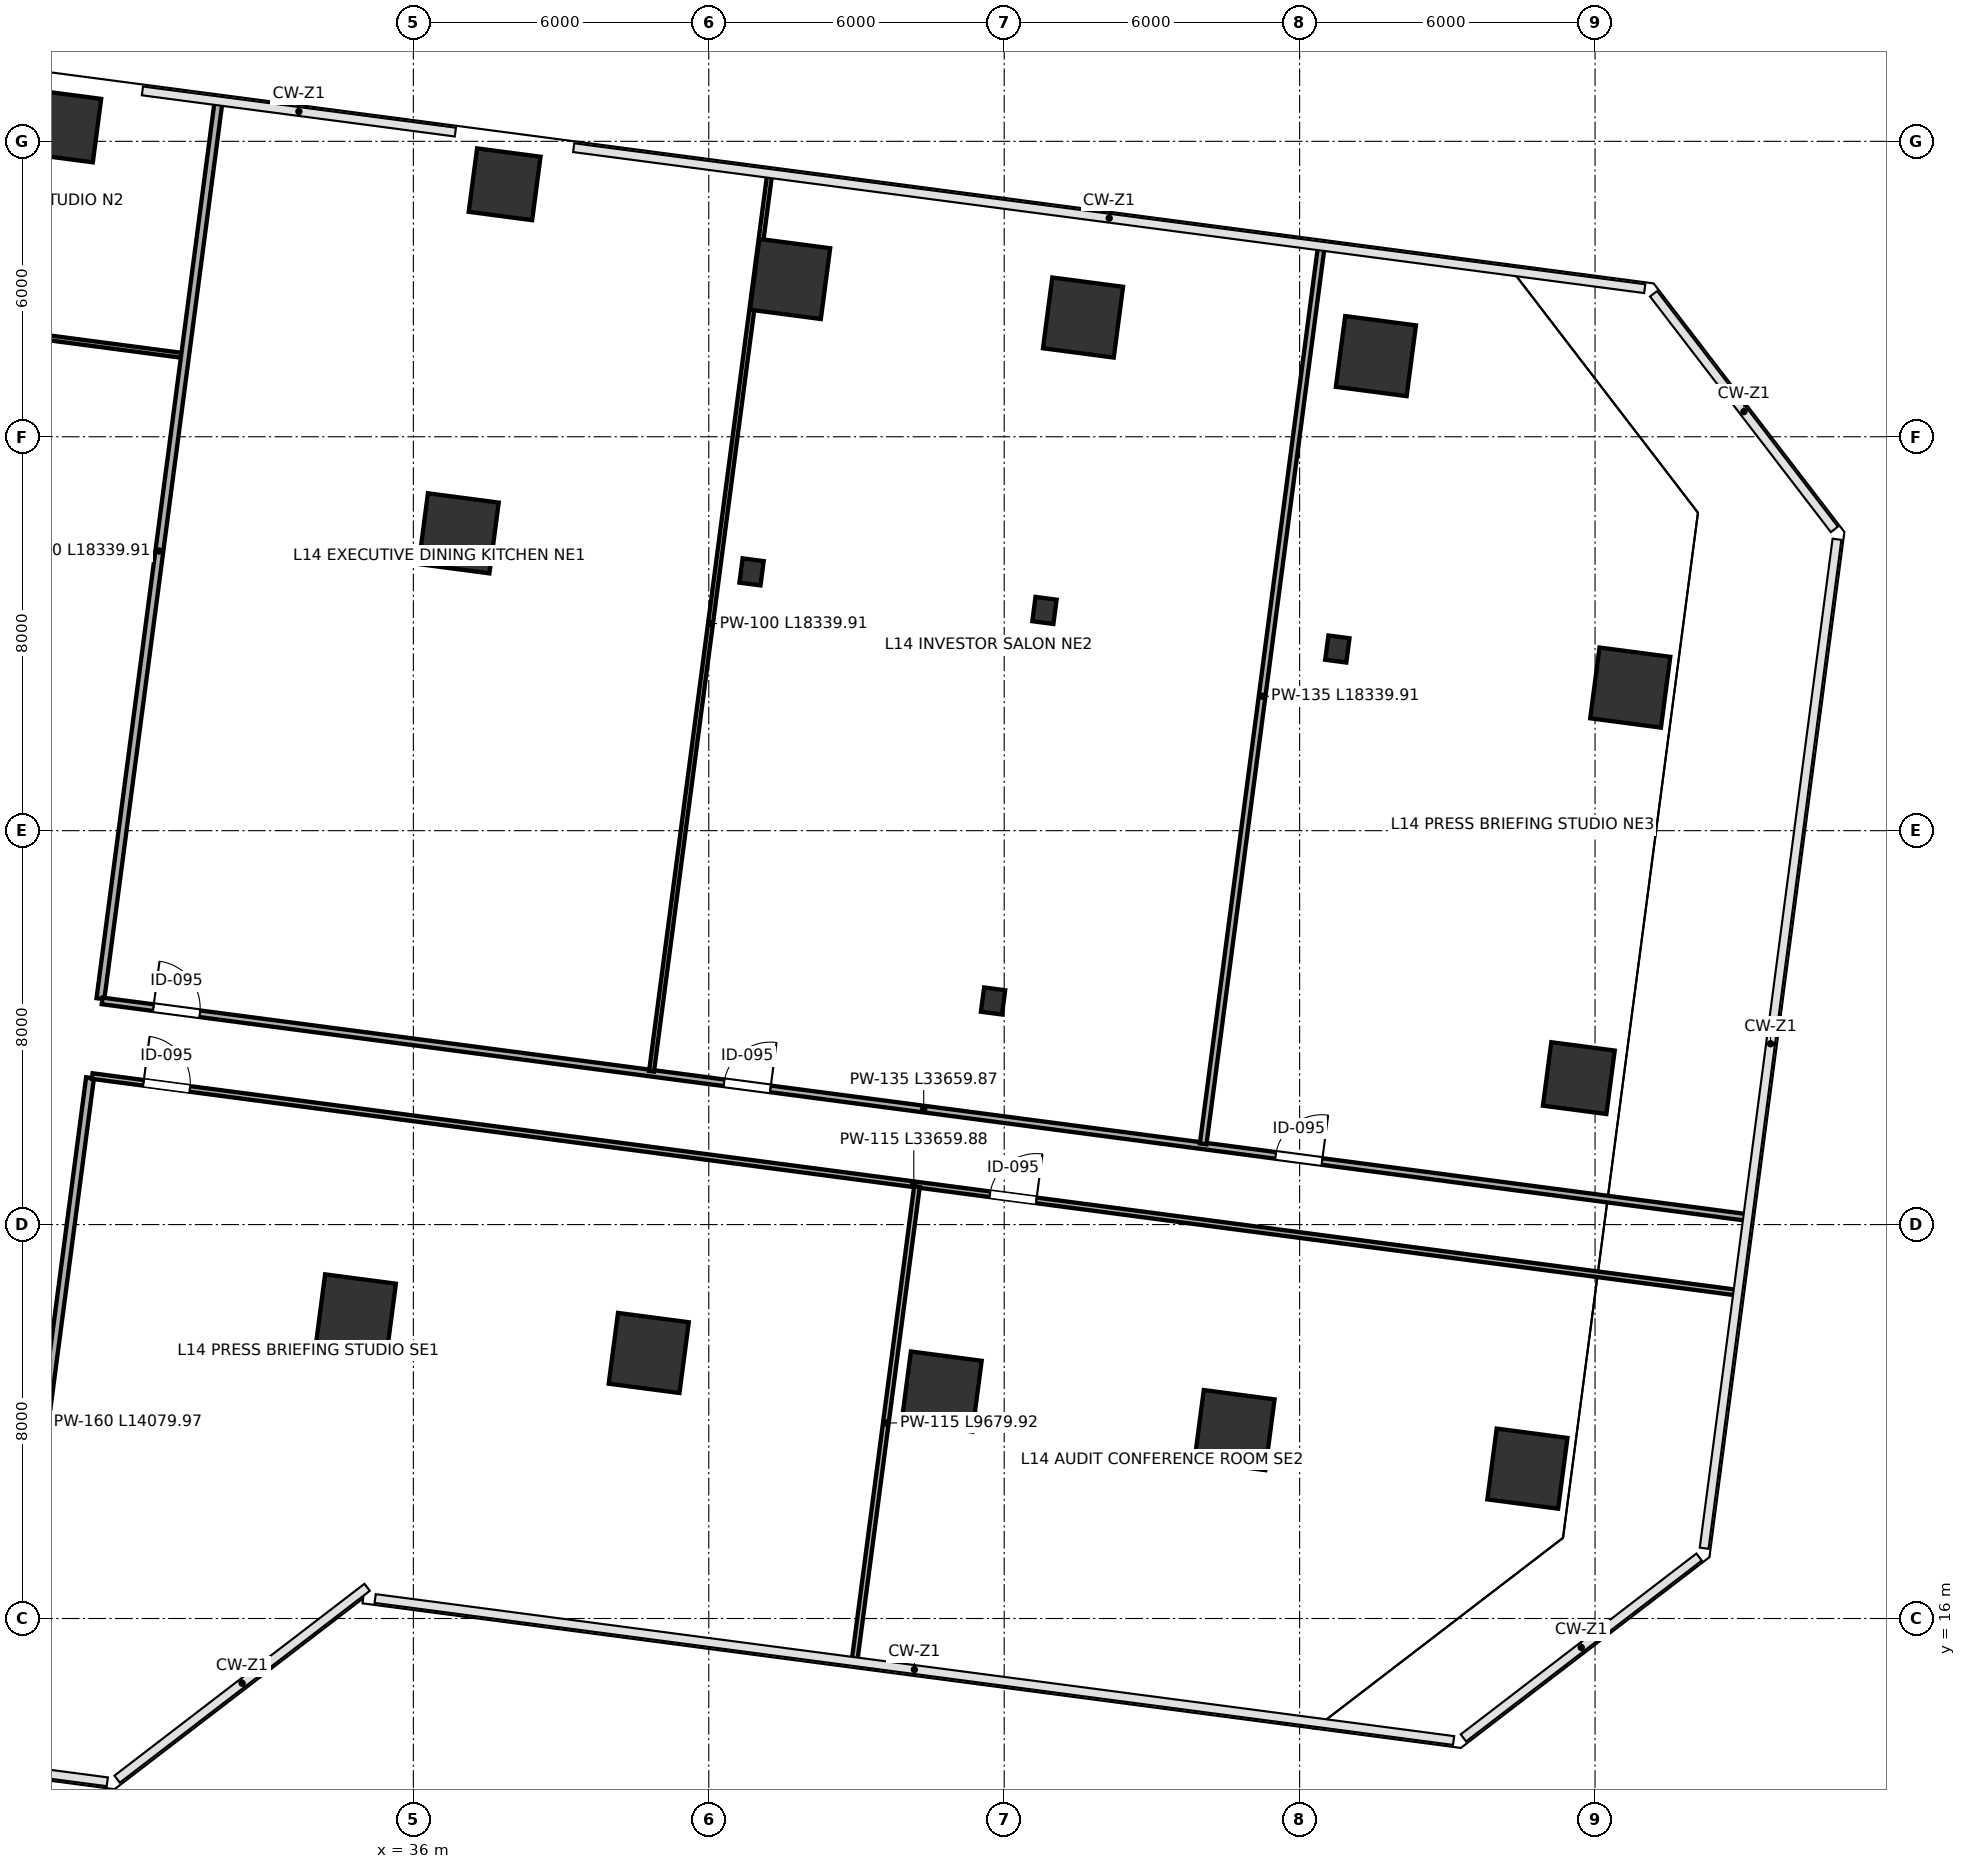
"""IFC4 building model, lengths in metres.
Left out: names, types, materials, properties, quantities, classifications, styles, units other than length and angle.
Written with IfcOpenShell. Run it as: python <this file> out.ifc"""

import sys

from ifc_helpers import new_model, si_unit, direction, frame, frame_2d, origin, origin_2d, place, context, subcontext, project, spatial, rectangle, i_section, extrude, clip, halfspace, source, transform, mapped, element, fill, save


model = new_model("IFC4")
c1 = context("Model", 3, precision=1e-05, world=origin(), true_north=direction((0.0, 1.0)))
c2 = subcontext(c1, "Body", "Model", "MODEL_VIEW")
j1 = project(units=[si_unit("LENGTHUNIT", "METRE"), si_unit("PLANEANGLEUNIT", "RADIAN")], contexts=[c1])
p1 = place(None, origin())
s1 = spatial("IfcSite", under=j1, at=p1, CompositionType="ELEMENT")
p2 = place(p1, origin())
s2 = spatial("IfcBuilding", under=s1, at=p2, CompositionType="ELEMENT")
p3 = place(p2, frame((0.0, 0.0, 66.4)))
s3 = spatial("IfcBuildingStorey", under=s2, at=p3, CompositionType="ELEMENT", Elevation=66.4)
p4 = place(p3, frame((28.93, 46.302, 0.0), z_axis=(0.073620538621, -0.039272010374, 0.996512782404), x_axis=(-0.581397277632, -0.813546918552, 0.010891137473)))
e1 = element("IfcColumn", 1, at=p4, inside=s3, PredefinedType="COLUMN", context=c2, shape_type="Clipping", body=[
    clip(clip(extrude(rectangle(XDim=1.3, YDim=1.3, at=origin_2d()), origin(), (0.0, 0.0, 1.0), 4.215), halfspace(frame((0.0, 0.0, 0.062), z_axis=(0.0, 0.0, -1.0), x_axis=(1.0, 0.0, 0.0)), False)), halfspace(frame((0.0, 0.0, 4.153), z_axis=(0.0, 0.0, 1.0), x_axis=(1.0, 0.0, 0.0)), False)),
])
p5 = place(p3, frame((34.832, 22.176, 0.0), z_axis=(-0.051599647604, -0.068452057765, 0.996319121645), x_axis=(-0.713426528526, 0.70064070417, 0.011188925565)))
e2 = element("IfcColumn", 2, at=p5, inside=s3, PredefinedType="COLUMN", context=c2, shape_type="Clipping", body=[
    clip(clip(extrude(rectangle(XDim=1.45, YDim=1.45, at=origin_2d()), origin(), (0.0, 0.0, 1.0), 4.216), halfspace(frame((0.0, 0.0, 0.071), z_axis=(0.0, 0.0, -1.0), x_axis=(1.0, 0.0, 0.0)), False)), halfspace(frame((0.0, 0.0, 4.145), z_axis=(0.0, 0.0, 1.0), x_axis=(1.0, 0.0, 0.0)), False)),
])
p6 = place(p3, frame((36.92, 38.039, 0.0), z_axis=(0.030346111021, -0.080092884622, 0.996325370237), x_axis=(-0.973205237042, -0.229666250615, 0.011179441968)))
e3 = element("IfcColumn", 3, at=p6, inside=s3, PredefinedType="COLUMN", context=c2, shape_type="Clipping", body=[
    clip(clip(extrude(rectangle(XDim=1.45, YDim=1.45, at=origin_2d()), origin(), (0.0, 0.0, 1.0), 4.216), halfspace(frame((0.0, 0.0, 0.071), z_axis=(0.0, 0.0, -1.0), x_axis=(1.0, 0.0, 0.0)), False)), halfspace(frame((0.0, 0.0, 4.145), z_axis=(0.0, 0.0, 1.0), x_axis=(1.0, 0.0, 0.0)), False)),
])
p7 = place(p3, frame((37.854, 45.128, 0.0), z_axis=(0.066856396357, -0.085174008842, 0.994120521106), x_axis=(-0.860003764034, -0.510091929367, 0.014133274303)))
e4 = element("IfcColumn", 4, at=p7, inside=s3, PredefinedType="COLUMN", context=c2, shape_type="Clipping", body=[
    clip(clip(extrude(rectangle(XDim=1.3, YDim=1.3, at=origin_2d()), origin(), (0.0, 0.0, 1.0), 4.225), halfspace(frame((0.0, 0.0, 0.08), z_axis=(0.0, 0.0, -1.0), x_axis=(1.0, 0.0, 0.0)), False)), halfspace(frame((0.0, 0.0, 4.145), z_axis=(0.0, 0.0, 1.0), x_axis=(1.0, 0.0, 0.0)), False)),
])
p8 = place(p3, frame((40.781, 21.393, 0.0), z_axis=(-0.055844325121, -0.098868132995, 0.993532336479), x_axis=(-0.799477522373, 0.600513133581, 0.014821188128)))
e5 = element("IfcColumn", 5, at=p8, inside=s3, PredefinedType="COLUMN", context=c2, shape_type="Clipping", body=[
    clip(clip(extrude(rectangle(XDim=1.45, YDim=1.45, at=origin_2d()), origin(), (0.0, 0.0, 1.0), 4.228), halfspace(frame((0.0, 0.0, 0.094), z_axis=(0.0, 0.0, -1.0), x_axis=(1.0, 0.0, 0.0)), False)), halfspace(frame((0.0, 0.0, 4.134), z_axis=(0.0, 0.0, 1.0), x_axis=(1.0, 0.0, 0.0)), False)),
])
p9 = place(p3, frame((42.869, 37.256, 0.0), z_axis=(0.025929664115, -0.110590883697, 0.993527709207), x_axis=(-0.994870546195, -0.100063839854, 0.014826471862)))
e6 = element("IfcColumn", 6, at=p9, inside=s3, PredefinedType="COLUMN", context=c2, shape_type="Clipping", body=[
    clip(clip(extrude(i_section(OverallWidth=0.432, OverallDepth=0.498, WebThickness=0.056, FlangeThickness=0.089, FilletRadius=0.015, at=origin_2d()), origin(), (0.0, 0.0, 1.0), 4.228), halfspace(frame((0.0, 0.0, 0.032), z_axis=(0.0, 0.0, -1.0), x_axis=(1.0, 0.0, 0.0)), False)), halfspace(frame((0.0, 0.0, 4.195), z_axis=(0.0, 0.0, 1.0), x_axis=(1.0, 0.0, 0.0)), False)),
])
p10 = place(p3, frame((43.652, 43.204, 0.0), z_axis=(0.056438358162, -0.114721483905, 0.991793170403), x_axis=(-0.946763532441, -0.321496998719, 0.016688123158)))
e7 = element("IfcColumn", 7, at=p10, inside=s3, PredefinedType="COLUMN", context=c2, shape_type="Clipping", body=[
    clip(clip(extrude(rectangle(XDim=1.45, YDim=1.45, at=origin_2d()), origin(), (0.0, 0.0, 1.0), 4.235), halfspace(frame((0.0, 0.0, 0.106), z_axis=(0.0, 0.0, -1.0), x_axis=(1.0, 0.0, 0.0)), False)), halfspace(frame((0.0, 0.0, 4.129), z_axis=(0.0, 0.0, 1.0), x_axis=(1.0, 0.0, 0.0)), False)),
])
p11 = place(p3, frame((46.729, 20.61, 0.0), z_axis=(-0.059950544993, -0.129106547951, 0.989816867623), x_axis=(-0.844815048038, 0.534735747326, 0.018579966109)))
e8 = element("IfcColumn", 8, at=p11, inside=s3, PredefinedType="COLUMN", context=c2, shape_type="Clipping", body=[
    clip(clip(extrude(rectangle(XDim=1.45, YDim=1.45, at=origin_2d()), origin(), (0.0, 0.0, 1.0), 4.243), halfspace(frame((0.0, 0.0, 0.118), z_axis=(0.0, 0.0, -1.0), x_axis=(1.0, 0.0, 0.0)), False)), halfspace(frame((0.0, 0.0, 4.126), z_axis=(0.0, 0.0, 1.0), x_axis=(1.0, 0.0, 0.0)), False)),
])
p12 = place(p3, frame((47.773, 28.541, 0.0), z_axis=(-0.019232806956, -0.134975148219, 0.990662308004), x_axis=(-0.96328957621, 0.267874044528, 0.017795747612)))
e9 = element("IfcColumn", 9, at=p12, inside=s3, PredefinedType="COLUMN", context=c2, shape_type="Clipping", body=[
    clip(clip(extrude(i_section(OverallWidth=0.432, OverallDepth=0.498, WebThickness=0.056, FlangeThickness=0.089, FilletRadius=0.015, at=origin_2d()), origin(), (0.0, 0.0, 1.0), 4.24), halfspace(frame((0.0, 0.0, 0.039), z_axis=(0.0, 0.0, -1.0), x_axis=(1.0, 0.0, 0.0)), False)), halfspace(frame((0.0, 0.0, 4.201), z_axis=(0.0, 0.0, 1.0), x_axis=(1.0, 0.0, 0.0)), False)),
])
p13 = place(p3, frame((48.817, 36.473, 0.0), z_axis=(0.021517704856, -0.140728091119, 0.989814423388), x_axis=(-0.999582161556, -0.022140567342, 0.018582184417)))
e10 = element("IfcColumn", 10, at=p13, inside=s3, PredefinedType="COLUMN", context=c2, shape_type="Clipping", body=[
    clip(clip(extrude(i_section(OverallWidth=0.432, OverallDepth=0.498, WebThickness=0.056, FlangeThickness=0.089, FilletRadius=0.015, at=origin_2d()), origin(), (0.0, 0.0, 1.0), 4.243), halfspace(frame((0.0, 0.0, 0.04), z_axis=(0.0, 0.0, -1.0), x_axis=(1.0, 0.0, 0.0)), False)), halfspace(frame((0.0, 0.0, 4.203), z_axis=(0.0, 0.0, 1.0), x_axis=(1.0, 0.0, 0.0)), False)),
])
p14 = place(p3, frame((49.601, 42.421, 0.0), z_axis=(0.051920569642, -0.14479176556, 0.988098982427), x_axis=(-0.976791061058, -0.213251304172, 0.020077457648)))
e11 = element("IfcColumn", 11, at=p14, inside=s3, PredefinedType="COLUMN", context=c2, shape_type="Clipping", body=[
    clip(clip(extrude(rectangle(XDim=1.45, YDim=1.45, at=origin_2d()), origin(), (0.0, 0.0, 1.0), 4.251), halfspace(frame((0.0, 0.0, 0.127), z_axis=(0.0, 0.0, -1.0), x_axis=(1.0, 0.0, 0.0)), False)), halfspace(frame((0.0, 0.0, 4.123), z_axis=(0.0, 0.0, 1.0), x_axis=(1.0, 0.0, 0.0)), False)),
])
p15 = place(p3, frame((52.678, 19.826, 0.0), z_axis=(-0.064024616391, -0.158858931905, 0.985223166724), x_axis=(-0.871499034688, 0.489887379184, 0.022355944494)))
e12 = element("IfcColumn", 12, at=p15, inside=s3, PredefinedType="COLUMN", context=c2, shape_type="Clipping", body=[
    clip(clip(extrude(rectangle(XDim=1.45, YDim=1.45, at=origin_2d()), origin(), (0.0, 0.0, 1.0), 4.263), halfspace(frame((0.0, 0.0, 0.142), z_axis=(0.0, 0.0, -1.0), x_axis=(1.0, 0.0, 0.0)), False)), halfspace(frame((0.0, 0.0, 4.121), z_axis=(0.0, 0.0, 1.0), x_axis=(1.0, 0.0, 0.0)), False)),
])
p16 = place(p3, frame((54.766, 35.689, 0.0), z_axis=(0.017008334322, -0.170426945934, 0.985223514063), x_axis=(-0.999314565848, 0.029506302541, 0.022355683703)))
e13 = element("IfcColumn", 13, at=p16, inside=s3, PredefinedType="COLUMN", context=c2, shape_type="Clipping", body=[
    clip(clip(extrude(i_section(OverallWidth=0.432, OverallDepth=0.498, WebThickness=0.056, FlangeThickness=0.089, FilletRadius=0.015, at=origin_2d()), origin(), (0.0, 0.0, 1.0), 4.263), halfspace(frame((0.0, 0.0, 0.049), z_axis=(0.0, 0.0, -1.0), x_axis=(1.0, 0.0, 0.0)), False)), halfspace(frame((0.0, 0.0, 4.215), z_axis=(0.0, 0.0, 1.0), x_axis=(1.0, 0.0, 0.0)), False)),
])
p17 = place(p3, frame((55.549, 41.638, 0.0), z_axis=(0.047335318552, -0.174477526836, 0.983522729909), x_axis=(-0.990469479879, -0.135695930822, 0.023597113954)))
e14 = element("IfcColumn", 14, at=p17, inside=s3, PredefinedType="COLUMN", context=c2, shape_type="Clipping", body=[
    clip(clip(extrude(rectangle(XDim=1.45, YDim=1.45, at=origin_2d()), origin(), (0.0, 0.0, 1.0), 4.271), halfspace(frame((0.0, 0.0, 0.15), z_axis=(0.0, 0.0, -1.0), x_axis=(1.0, 0.0, 0.0)), False)), halfspace(frame((0.0, 0.0, 4.12), z_axis=(0.0, 0.0, 1.0), x_axis=(1.0, 0.0, 0.0)), False)),
])
p18 = place(p3, frame((58.626, 19.043, 0.0), z_axis=(-0.067998456906, -0.188220184318, 0.979770060817), x_axis=(-0.889007107225, 0.457147697443, 0.026121753896)))
e15 = element("IfcColumn", 15, at=p18, inside=s3, PredefinedType="COLUMN", context=c2, shape_type="Clipping", body=[
    clip(clip(extrude(rectangle(XDim=1.45, YDim=1.45, at=origin_2d()), origin(), (0.0, 0.0, 1.0), 4.287), halfspace(frame((0.0, 0.0, 0.167), z_axis=(0.0, 0.0, -1.0), x_axis=(1.0, 0.0, 0.0)), False)), halfspace(frame((0.0, 0.0, 4.12), z_axis=(0.0, 0.0, 1.0), x_axis=(1.0, 0.0, 0.0)), False)),
])
p19 = place(p3, frame((59.671, 26.975, 0.0), z_axis=(-0.027701062855, -0.194078434203, 0.980594825855), x_axis=(-0.963412268305, 0.266799553042, 0.025589055784)))
e16 = element("IfcColumn", 16, at=p19, inside=s3, PredefinedType="COLUMN", context=c2, shape_type="Clipping", body=[
    clip(clip(extrude(rectangle(XDim=1.3, YDim=1.3, at=origin_2d()), origin(), (0.0, 0.0, 1.0), 4.283), halfspace(frame((0.0, 0.0, 0.146), z_axis=(0.0, 0.0, -1.0), x_axis=(1.0, 0.0, 0.0)), False)), halfspace(frame((0.0, 0.0, 4.137), z_axis=(0.0, 0.0, 1.0), x_axis=(1.0, 0.0, 0.0)), False)),
])
p20 = place(p3, frame((60.715, 34.906, 0.0), z_axis=(0.012585994778, -0.199724360578, 0.979771285825), x_axis=(-0.997525135638, 0.06527862315, 0.026120971074)))
e17 = element("IfcColumn", 17, at=p20, inside=s3, PredefinedType="COLUMN", context=c2, shape_type="Clipping", body=[
    clip(clip(extrude(rectangle(XDim=1.45, YDim=1.45, at=origin_2d()), origin(), (0.0, 0.0, 1.0), 4.287), halfspace(frame((0.0, 0.0, 0.167), z_axis=(0.0, 0.0, -1.0), x_axis=(1.0, 0.0, 0.0)), False)), halfspace(frame((0.0, 0.0, 4.12), z_axis=(0.0, 0.0, 1.0), x_axis=(1.0, 0.0, 0.0)), False)),
])
p21 = place(p3, frame((5.546, 45.044, 0.0), z_axis=(0.0, 0.0, 1.0), x_axis=(0.99144534416, -0.13052252504, 0.0)))
e18 = element("IfcWall", 18, at=p21, inside=s3, PredefinedType="PARTITIONING", context=c2, shape_type="SweptSolid", body=[
    extrude(rectangle(XDim=26.0, YDim=0.1, at=frame_2d((13.0, 0.0))), origin(), (0.0, 0.0, 1.0), 3.96),
])
p22 = place(p21, frame((0.91, 0.0, 0.0)))
e19 = element("IfcOpeningElement", 19, at=p22, cuts=e18, PredefinedType="OPENING", context=c2, shape_type="SweptSolid", body=[
    extrude(rectangle(XDim=0.95, YDim=2.15, at=frame_2d((0.475, 1.075))), frame((0.0, 0.06, 0.0), z_axis=(0.0, -1.0, 0.0), x_axis=(1.0, 0.0, 0.0)), (0.0, 0.0, 1.0), 0.12),
])
p23 = place(p21, frame((19.11, 0.0, 0.0)))
e20 = element("IfcOpeningElement", 20, at=p23, cuts=e18, PredefinedType="OPENING", context=c2, shape_type="SweptSolid", body=[
    extrude(rectangle(XDim=0.95, YDim=2.15, at=frame_2d((0.475, 1.075))), frame((0.0, 0.06, 0.0), z_axis=(0.0, -1.0, 0.0), x_axis=(1.0, 0.0, 0.0)), (0.0, 0.0, 1.0), 0.12),
])
p24 = place(p3, frame((29.644, 28.588, 0.0), z_axis=(0.0, 0.0, 1.0), x_axis=(0.130525105318, 0.991445004467, 0.0)))
e21 = element("IfcWall", 21, at=p24, inside=s3, PredefinedType="PARTITIONING", context=c2, shape_type="SweptSolid", body=[
    extrude(rectangle(XDim=18.34, YDim=0.16, at=frame_2d((9.17, 0.0))), origin(), (0.0, 0.0, 1.0), 3.095),
])
p25 = place(p3, frame((27.595, 13.022, 0.0), z_axis=(0.0, 0.0, 1.0), x_axis=(0.130532558102, 0.991444023269, 0.0)))
e22 = element("IfcWall", 22, at=p25, inside=s3, PredefinedType="PARTITIONING", context=c2, shape_type="SweptSolid", body=[
    extrude(rectangle(XDim=14.08, YDim=0.16, at=frame_2d((7.04, 0.0))), origin(), (0.0, 0.0, 1.0), 3.96),
])
p26 = place(p3, frame((29.679, 28.543, 0.0), z_axis=(0.0, 0.0, 1.0), x_axis=(0.991444714197, -0.130527310133, 0.0)))
e23 = element("IfcWall", 23, at=p26, inside=s3, PredefinedType="PARTITIONING", context=c2, shape_type="SweptSolid", body=[
    extrude(rectangle(XDim=33.66, YDim=0.135, at=frame_2d((16.83, 0.0))), origin(), (0.0, 0.0, 1.0), 3.095),
])
p27 = place(p26, frame((1.05, 0.0, 0.0)))
e24 = element("IfcOpeningElement", 24, at=p27, cuts=e23, PredefinedType="OPENING", context=c2, shape_type="SweptSolid", body=[
    extrude(rectangle(XDim=0.95, YDim=2.15, at=frame_2d((0.475, 1.075))), frame((0.0, 0.078, 0.0), z_axis=(0.0, -1.0, 0.0), x_axis=(1.0, 0.0, 0.0)), (0.0, 0.0, 1.0), 0.155),
])
p28 = place(p26, frame((12.74, 0.0, 0.0)))
e25 = element("IfcOpeningElement", 25, at=p28, cuts=e23, PredefinedType="OPENING", context=c2, shape_type="SweptSolid", body=[
    extrude(rectangle(XDim=0.95, YDim=2.15, at=frame_2d((0.475, 1.075))), frame((0.0, 0.078, 0.0), z_axis=(0.0, -1.0, 0.0), x_axis=(1.0, 0.0, 0.0)), (0.0, 0.0, 1.0), 0.155),
])
p29 = place(p26, frame((24.04, 0.0, 0.0)))
e26 = element("IfcOpeningElement", 26, at=p29, cuts=e23, PredefinedType="OPENING", context=c2, shape_type="SweptSolid", body=[
    extrude(rectangle(XDim=0.95, YDim=2.15, at=frame_2d((0.475, 1.075))), frame((0.0, 0.078, 0.0), z_axis=(0.0, -1.0, 0.0), x_axis=(1.0, 0.0, 0.0)), (0.0, 0.0, 1.0), 0.155),
])
p30 = place(p3, frame((29.478, 27.016, 0.0), z_axis=(0.0, 0.0, 1.0), x_axis=(0.991444590622, -0.130528248771, 0.0)))
e27 = element("IfcWall", 27, at=p30, inside=s3, PredefinedType="PARTITIONING", context=c2, shape_type="SweptSolid", body=[
    extrude(rectangle(XDim=33.66, YDim=0.115, at=frame_2d((16.83, 0.0))), origin(), (0.0, 0.0, 1.0), 3.095),
])
p31 = place(p30, frame((1.05, 0.0, 0.0)))
e28 = element("IfcOpeningElement", 28, at=p31, cuts=e27, PredefinedType="OPENING", context=c2, shape_type="SweptSolid", body=[
    extrude(rectangle(XDim=0.95, YDim=2.15, at=frame_2d((0.475, 1.075))), frame((0.0, 0.067, 0.0), z_axis=(0.0, -1.0, 0.0), x_axis=(1.0, 0.0, 0.0)), (0.0, 0.0, 1.0), 0.135),
])
p32 = place(p30, frame((18.39, 0.0, 0.0)))
e29 = element("IfcOpeningElement", 29, at=p32, cuts=e27, PredefinedType="OPENING", context=c2, shape_type="SweptSolid", body=[
    extrude(rectangle(XDim=0.95, YDim=2.15, at=frame_2d((0.475, 1.075))), frame((0.0, 0.067, 0.0), z_axis=(0.0, -1.0, 0.0), x_axis=(1.0, 0.0, 0.0)), (0.0, 0.0, 1.0), 0.135),
])
p33 = place(p3, frame((40.838, 27.114, 0.0), z_axis=(0.0, 0.0, 1.0), x_axis=(0.130538190585, 0.991443281685, 0.0)))
e30 = element("IfcWall", 30, at=p33, inside=s3, PredefinedType="PARTITIONING", context=c2, shape_type="SweptSolid", body=[
    extrude(rectangle(XDim=18.34, YDim=0.1, at=frame_2d((9.17, 0.0))), origin(), (0.0, 0.0, 1.0), 3.96),
])
p34 = place(p3, frame((52.041, 25.639, 0.0), z_axis=(0.0, 0.0, 1.0), x_axis=(0.130523382643, 0.991445231258, 0.0)))
e31 = element("IfcWall", 31, at=p34, inside=s3, PredefinedType="PARTITIONING", context=c2, shape_type="SweptSolid", body=[
    extrude(rectangle(XDim=18.34, YDim=0.135, at=frame_2d((9.17, 0.0))), origin(), (0.0, 0.0, 1.0), 3.323),
])
p35 = place(p3, frame((44.964, 15.173, 0.0), z_axis=(0.0, 0.0, 1.0), x_axis=(0.130519754353, 0.991445708914, 0.0)))
e32 = element("IfcWall", 32, at=p35, inside=s3, PredefinedType="PARTITIONING", context=c2, shape_type="SweptSolid", body=[
    extrude(rectangle(XDim=9.68, YDim=0.115, at=frame_2d((4.84, 0.0))), origin(), (0.0, 0.0, 1.0), 3.96),
])
m1 = source(origin(), c2, "Body", "SweptSolid", [
    extrude(rectangle(XDim=0.95, YDim=2.15, at=frame_2d((0.475, 1.075))), frame((0.0, 0.025, 0.0), z_axis=(0.0, -1.0, 0.0), x_axis=(1.0, 0.0, 0.0)), (0.0, 0.0, 1.0), 0.05),
])
p36 = place(p27, origin())
e33 = element("IfcDoor", 33, at=p36, inside=s3, OperationType="SINGLE_SWING_LEFT", PredefinedType="DOOR", context=c2, shape_type="MappedRepresentation", body=[
    mapped(m1, transform((0.0, 0.0, 0.0), scale=1.0)),
])
fill(e24, e33)
p37 = place(p28, origin())
e34 = element("IfcDoor", 34, at=p37, inside=s3, OperationType="SINGLE_SWING_RIGHT", PredefinedType="DOOR", context=c2, shape_type="MappedRepresentation", body=[
    mapped(m1, transform((0.0, 0.0, 0.0), scale=1.0)),
])
fill(e25, e34)
p38 = place(p29, origin())
e35 = element("IfcDoor", 35, at=p38, inside=s3, OperationType="SINGLE_SWING_RIGHT", PredefinedType="DOOR", context=c2, shape_type="MappedRepresentation", body=[
    mapped(m1, transform((0.0, 0.0, 0.0), scale=1.0)),
])
fill(e26, e35)
p39 = place(p31, origin())
e36 = element("IfcDoor", 36, at=p39, inside=s3, OperationType="SINGLE_SWING_LEFT", PredefinedType="DOOR", context=c2, shape_type="MappedRepresentation", body=[
    mapped(m1, transform((0.0, 0.0, 0.0), scale=1.0)),
])
fill(e28, e36)
p40 = place(p32, origin())
e37 = element("IfcDoor", 37, at=p40, inside=s3, OperationType="SINGLE_SWING_RIGHT", PredefinedType="DOOR", context=c2, shape_type="MappedRepresentation", body=[
    mapped(m1, transform((0.0, 0.0, 0.0), scale=1.0)),
])
fill(e29, e37)
save(model, sys.argv[1])
